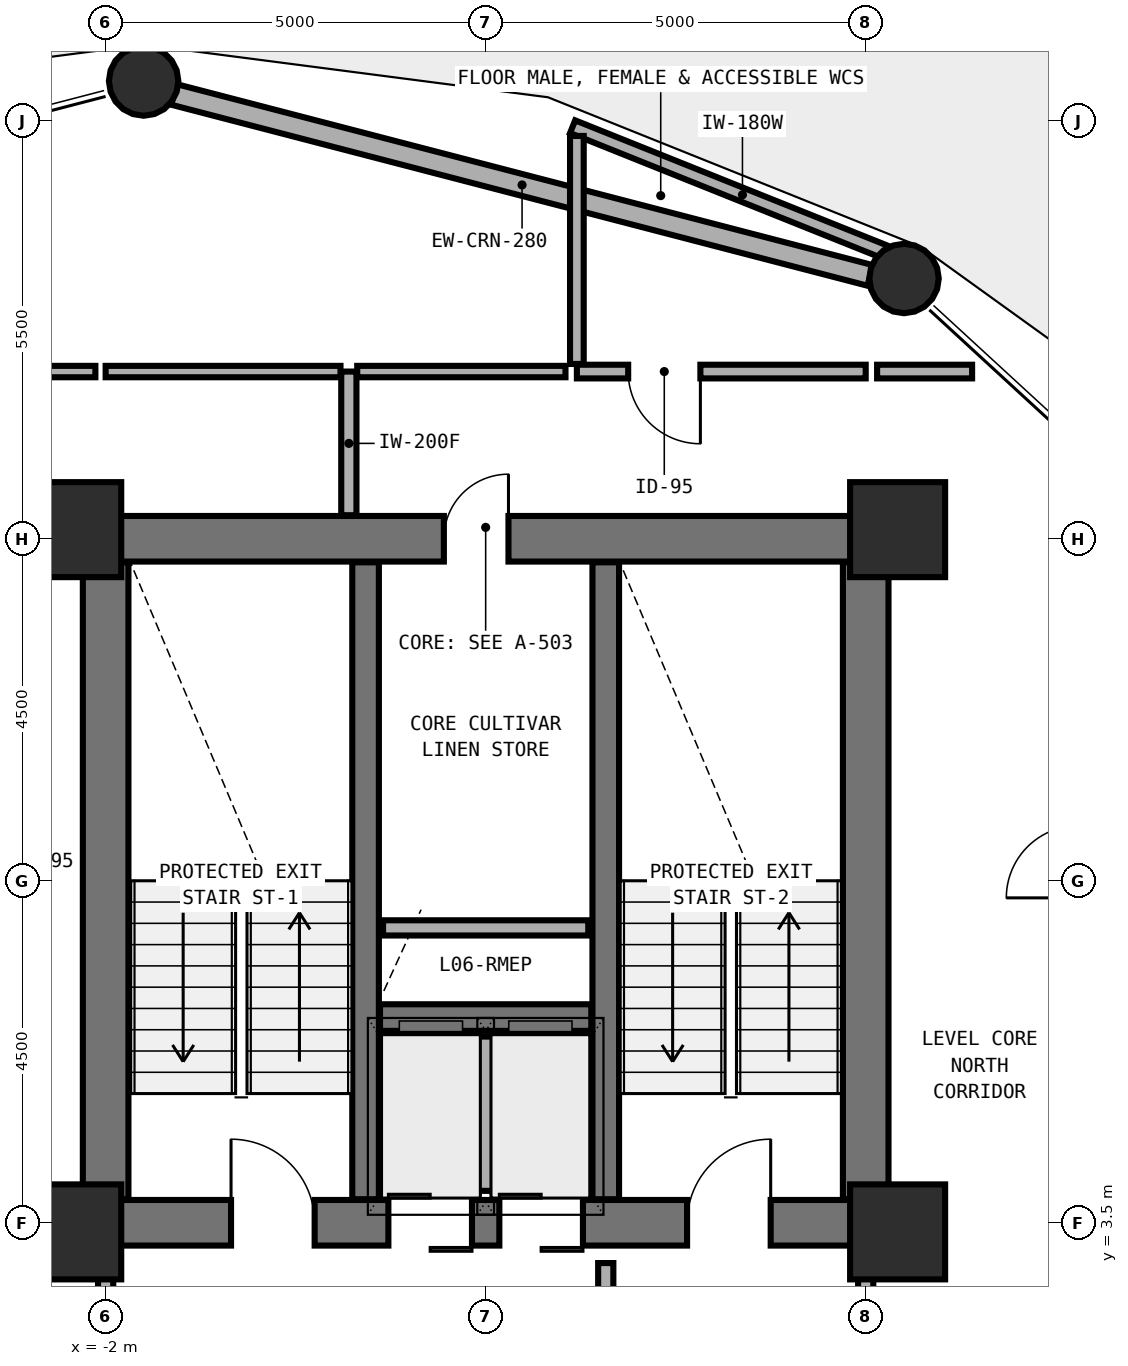
"""IFC4 building model, lengths in metres.
Left out: names, types, materials, properties, quantities, classifications, styles, units other than length and angle.
Written with IfcOpenShell. Run it as: python <this file> out.ifc"""

import sys

from ifc_helpers import new_model, si_unit, direction, frame, frame_2d, origin, origin_2d, place, context, subcontext, project, spatial, rectangle, hollow_circle, extrude, element, fill, save


model = new_model("IFC4")
c1 = context("Model", 3, precision=1e-05, world=origin(), true_north=direction((0.0, 1.0)))
c2 = subcontext(c1, "Body", "Model", "MODEL_VIEW")
j1 = project(units=[si_unit("LENGTHUNIT", "METRE"), si_unit("PLANEANGLEUNIT", "RADIAN")], contexts=[c1])
p1 = place(None, origin())
s1 = spatial("IfcSite", under=j1, at=p1, CompositionType="ELEMENT")
p2 = place(p1, origin())
s2 = spatial("IfcBuilding", under=s1, at=p2, CompositionType="ELEMENT")
p3 = place(p2, frame((0.0, 0.0, 27.6)))
s3 = spatial("IfcBuildingStorey", under=s2, at=p3, CompositionType="ELEMENT", Elevation=27.6)
p4 = place(p3, frame((-2.0, 3.5, 0.0), z_axis=(0.0, 0.0, 1.0), x_axis=(1.0, 0.0, 0.0)))
e1 = element("IfcWall", 1, at=p4, inside=s3, PredefinedType="SHEAR", context=c2, shape_type="SweptSolid", body=[
    extrude(rectangle(XDim=10.0, YDim=0.6, at=frame_2d((5.0, 0.0))), origin(), (0.0, 0.0, 1.0), 3.892),
])
p5 = place(p4, frame((1.65, 0.0, 0.0)))
e2 = element("IfcOpeningElement", 2, at=p5, cuts=e1, PredefinedType="OPENING", context=c2, shape_type="SweptSolid", body=[
    extrude(rectangle(XDim=1.1, YDim=2.15, at=frame_2d((0.55, 1.075))), frame((0.0, 0.31, 0.0), z_axis=(0.0, -1.0, 0.0), x_axis=(1.0, 0.0, 0.0)), (0.0, 0.0, 1.0), 0.62),
])
p6 = place(p4, frame((7.65, 0.0, 0.0)))
e3 = element("IfcOpeningElement", 3, at=p6, cuts=e1, PredefinedType="OPENING", context=c2, shape_type="SweptSolid", body=[
    extrude(rectangle(XDim=1.1, YDim=2.15, at=frame_2d((0.55, 1.075))), frame((0.0, 0.31, 0.0), z_axis=(0.0, -1.0, 0.0), x_axis=(1.0, 0.0, 0.0)), (0.0, 0.0, 1.0), 0.62),
])
p7 = place(p4, frame((3.72, 0.0, 0.0)))
e4 = element("IfcOpeningElement", 4, at=p7, cuts=e1, PredefinedType="OPENING", context=c2, shape_type="SweptSolid", body=[
    extrude(rectangle(XDim=1.1, YDim=2.2, at=frame_2d((0.55, 1.1))), frame((0.0, 0.31, 0.0), z_axis=(0.0, -1.0, 0.0), x_axis=(1.0, 0.0, 0.0)), (0.0, 0.0, 1.0), 0.62),
])
p8 = place(p4, frame((5.18, 0.0, 0.0)))
e5 = element("IfcOpeningElement", 5, at=p8, cuts=e1, PredefinedType="OPENING", context=c2, shape_type="SweptSolid", body=[
    extrude(rectangle(XDim=1.1, YDim=2.2, at=frame_2d((0.55, 1.1))), frame((0.0, 0.31, 0.0), z_axis=(0.0, -1.0, 0.0), x_axis=(1.0, 0.0, 0.0)), (0.0, 0.0, 1.0), 0.62),
])
p9 = place(p3, frame((-2.0, 12.5, 0.0), z_axis=(0.0, 0.0, 1.0), x_axis=(1.0, 0.0, 0.0)))
e6 = element("IfcWall", 6, at=p9, inside=s3, PredefinedType="SHEAR", context=c2, shape_type="SweptSolid", body=[
    extrude(rectangle(XDim=10.0, YDim=0.6, at=frame_2d((5.0, 0.0))), origin(), (0.0, 0.0, 1.0), 3.892),
])
p10 = place(p9, frame((4.45, 0.0, 0.0)))
e7 = element("IfcOpeningElement", 7, at=p10, cuts=e6, PredefinedType="OPENING", context=c2, shape_type="SweptSolid", body=[
    extrude(rectangle(XDim=0.85, YDim=2.1, at=frame_2d((0.425, 1.05))), frame((0.0, 0.31, 0.0), z_axis=(0.0, -1.0, 0.0), x_axis=(1.0, 0.0, 0.0)), (0.0, 0.0, 1.0), 0.62),
])
for number, where, z_axis, x_axis in (
    (8, (-2.0, 3.81, 0.0), (0.0, 0.0, 1.0), (0.0, 1.0, 0.0)),
    (9, (8.0, 3.81, 0.0), (0.0, 0.0, 1.0), (0.0, 1.0, 0.0)),
):
    element("IfcWall", number, at=place(p3, frame(where, z_axis=z_axis, x_axis=x_axis)), inside=s3, PredefinedType="SHEAR", context=c2, shape_type="SweptSolid", body=[
        extrude(rectangle(XDim=8.38, YDim=0.6, at=frame_2d((4.19, 0.0))), origin(), (0.0, 0.0, 1.0), 3.892),
    ])
for number, where, z_axis, x_axis in (
    (10, (1.42, 3.81, 0.0), (0.0, 0.0, 1.0), (0.0, 1.0, 0.0)),
    (11, (4.58, 3.81, 0.0), (0.0, 0.0, 1.0), (0.0, 1.0, 0.0)),
):
    element("IfcWall", number, at=place(p3, frame(where, z_axis=z_axis, x_axis=x_axis)), inside=s3, PredefinedType="SHEAR", context=c2, shape_type="SweptSolid", body=[
        extrude(rectangle(XDim=8.38, YDim=0.35, at=frame_2d((4.19, 0.0))), origin(), (0.0, 0.0, 1.0), 3.892),
    ])
p11 = place(p3, frame((1.61, 6.2, 0.0), z_axis=(0.0, 0.0, 1.0), x_axis=(1.0, 0.0, 0.0)))
e12 = element("IfcWall", 12, at=p11, inside=s3, PredefinedType="SHEAR", context=c2, shape_type="SweptSolid", body=[
    extrude(rectangle(XDim=2.78, YDim=0.35, at=frame_2d((1.39, 0.0))), origin(), (0.0, 0.0, 1.0), 3.892),
])
for number, where, z_axis, x_axis in (
    (13, (-2.42, 12.62, 0.0), (0.0, 0.0, 1.0), (1.0, 0.0, 0.0)),
    (14, (8.42, 12.62, 0.0), (0.0, 0.0, 1.0), (1.0, 0.0, 0.0)),
    (15, (-2.42, 3.38, 0.0), (0.0, 0.0, 1.0), (1.0, 0.0, 0.0)),
    (16, (8.42, 3.38, 0.0), (0.0, 0.0, 1.0), (1.0, 0.0, 0.0)),
):
    element("IfcColumn", number, at=place(p3, frame(where, z_axis=z_axis, x_axis=x_axis)), inside=s3, PredefinedType="COLUMN", context=c2, shape_type="SweptSolid", body=[
        extrude(rectangle(XDim=1.25, YDim=1.25, at=origin_2d()), origin(), (0.0, 0.0, 1.0), 3.875),
    ])
p12 = place(p3, frame((8.458, 15.861, 0.0), z_axis=(0.024236523215, 0.032609140326, 0.999174276545), x_axis=(-0.802595483818, 0.596523670406, 0.0)))
e17 = element("IfcColumn", 17, at=p12, inside=s3, PredefinedType="COLUMN", context=c2, shape_type="SweptSolid", body=[
    extrude(hollow_circle(Radius=0.457, WallThickness=0.032, at=origin_2d()), origin(), (0.0, 0.0, 1.0), 3.878),
])
p13 = place(p3, frame((-1.5, 18.45, 0.0), z_axis=(0.0, 0.037649698668, 0.999290998754), x_axis=(-1.0, 0.0, 0.0)))
e18 = element("IfcColumn", 18, at=p13, inside=s3, PredefinedType="COLUMN", context=c2, shape_type="SweptSolid", body=[
    extrude(hollow_circle(Radius=0.457, WallThickness=0.032, at=origin_2d()), origin(), (0.0, 0.0, 1.0), 3.878),
])
p14 = place(p3, frame((-1.101, 18.346, 0.0), z_axis=(0.0, 0.0, 1.0), x_axis=(0.967836325918, -0.251580695274, 0.0)))
e19 = element("IfcWall", 19, at=p14, inside=s3, PredefinedType="SOLIDWALL", context=c2, shape_type="SweptSolid", body=[
    extrude(rectangle(XDim=9.465, YDim=0.28, at=frame_2d((4.732, 0.0))), origin(), (0.0, 0.0, 1.0), 3.06),
])
p15 = place(p3, frame((3.0, 3.92, 0.0), z_axis=(0.0, 0.0, 1.0), x_axis=(0.0, 1.0, 0.0)))
e20 = element("IfcWall", 20, at=p15, inside=s3, PredefinedType="SOLIDWALL", context=c2, shape_type="SweptSolid", body=[
    extrude(rectangle(XDim=2.03, YDim=0.2, at=frame_2d((1.015, 0.0))), origin(), (0.0, 0.0, 1.0), 3.64),
])
p16 = place(p3, frame((1.65, 7.38, 0.0), z_axis=(0.0, 0.0, 1.0), x_axis=(1.0, 0.0, 0.0)))
e21 = element("IfcWall", 21, at=p16, inside=s3, PredefinedType="SOLIDWALL", context=c2, shape_type="SweptSolid", body=[
    extrude(rectangle(XDim=2.7, YDim=0.2, at=frame_2d((1.35, 0.0))), origin(), (0.0, 0.0, 1.0), 3.64),
])
p17 = place(p3, frame((4.58, 0.83, 0.0), z_axis=(0.0, 0.0, 1.0), x_axis=(0.0, 1.0, 0.0)))
e22 = element("IfcWall", 22, at=p17, inside=s3, PredefinedType="MOVABLE", context=c2, shape_type="SweptSolid", body=[
    extrude(rectangle(XDim=2.14, YDim=0.2, at=frame_2d((1.07, 0.0))), origin(), (0.0, 0.0, 1.0), 3.64),
])
p18 = place(p17, frame((0.66, 0.0, 0.0)))
e23 = element("IfcOpeningElement", 23, at=p18, cuts=e22, PredefinedType="OPENING", context=c2, shape_type="SweptSolid", body=[
    extrude(rectangle(XDim=1.0, YDim=2.1, at=frame_2d((0.5, 1.05))), frame((0.0, 0.11, 0.0), z_axis=(0.0, -1.0, 0.0), x_axis=(1.0, 0.0, 0.0)), (0.0, 0.0, 1.0), 0.22),
])
p19 = place(p3, frame((-2.0, 0.72, 0.0), z_axis=(0.0, 0.0, 1.0), x_axis=(0.0, 1.0, 0.0)))
e24 = element("IfcWall", 24, at=p19, inside=s3, PredefinedType="MOVABLE", context=c2, shape_type="SweptSolid", body=[
    extrude(rectangle(XDim=2.25, YDim=0.2, at=frame_2d((1.125, 0.0))), origin(), (0.0, 0.0, 1.0), 2.872),
])
p20 = place(p19, frame((0.845, 0.0, 0.0)))
e25 = element("IfcOpeningElement", 25, at=p20, cuts=e24, PredefinedType="OPENING", context=c2, shape_type="SweptSolid", body=[
    extrude(rectangle(XDim=0.85, YDim=2.1, at=frame_2d((0.425, 1.05))), frame((0.0, 0.11, 0.0), z_axis=(0.0, -1.0, 0.0), x_axis=(1.0, 0.0, 0.0)), (0.0, 0.0, 1.0), 0.22),
])
p21 = place(p3, frame((8.0, 0.72, 0.0), z_axis=(0.0, 0.0, 1.0), x_axis=(0.0, 1.0, 0.0)))
e26 = element("IfcWall", 26, at=p21, inside=s3, PredefinedType="MOVABLE", context=c2, shape_type="SweptSolid", body=[
    extrude(rectangle(XDim=2.25, YDim=0.2, at=frame_2d((1.125, 0.0))), origin(), (0.0, 0.0, 1.0), 2.872),
])
p22 = place(p21, frame((0.845, 0.0, 0.0)))
e27 = element("IfcOpeningElement", 27, at=p22, cuts=e26, PredefinedType="OPENING", context=c2, shape_type="SweptSolid", body=[
    extrude(rectangle(XDim=0.85, YDim=2.1, at=frame_2d((0.425, 1.05))), frame((0.0, 0.11, 0.0), z_axis=(0.0, -1.0, 0.0), x_axis=(1.0, 0.0, 0.0)), (0.0, 0.0, 1.0), 0.22),
])
p23 = place(p3, frame((8.0, 14.7, 0.0), z_axis=(0.0, 0.0, 1.0), x_axis=(-1.0, 0.0, 0.0)))
e28 = element("IfcWall", 28, at=p23, inside=s3, PredefinedType="PLUMBINGWALL", context=c2, shape_type="SweptSolid", body=[
    extrude(rectangle(XDim=3.8, YDim=0.18, at=frame_2d((1.9, 0.0))), origin(), (0.0, 0.0, 1.0), 3.122),
])
p24 = place(p23, frame((2.175, 0.0, 0.0)))
e29 = element("IfcOpeningElement", 29, at=p24, cuts=e28, PredefinedType="OPENING", context=c2, shape_type="SweptSolid", body=[
    extrude(rectangle(XDim=0.95, YDim=2.1, at=frame_2d((0.475, 1.05))), frame((0.0, 0.1, 0.0), z_axis=(0.0, -1.0, 0.0), x_axis=(1.0, 0.0, 0.0)), (0.0, 0.0, 1.0), 0.2),
])
p25 = place(p3, frame((1.2, 14.7, 0.0), z_axis=(0.0, 0.0, 1.0), x_axis=(0.0, -1.0, 0.0)))
e30 = element("IfcWall", 30, at=p25, inside=s3, PredefinedType="MOVABLE", context=c2, shape_type="SweptSolid", body=[
    extrude(rectangle(XDim=1.89, YDim=0.2, at=frame_2d((0.945, 0.0))), origin(), (0.0, 0.0, 1.0), 3.64),
])
p26 = place(p3, frame((9.4, 14.7, 0.0), z_axis=(0.0, 0.0, 1.0), x_axis=(-1.0, 0.0, 0.0)))
e31 = element("IfcWall", 31, at=p26, inside=s3, PredefinedType="PLUMBINGWALL", context=c2, shape_type="SweptSolid", body=[
    extrude(rectangle(XDim=1.25, YDim=0.18, at=frame_2d((0.625, 0.0))), origin(), (0.0, 0.0, 1.0), 3.122),
])
p27 = place(p3, frame((1.09, 14.7, 0.0), z_axis=(0.0, 0.0, 1.0), x_axis=(-1.0, 0.0, 0.0)))
e32 = element("IfcWall", 32, at=p27, inside=s3, PredefinedType="PARTITIONING", context=c2, shape_type="SweptSolid", body=[
    extrude(rectangle(XDim=3.09, YDim=0.15, at=frame_2d((1.545, 0.0))), origin(), (0.0, 0.0, 1.0), 3.122),
])
p28 = place(p3, frame((-2.135, 14.7, 0.0), z_axis=(0.0, 0.0, 1.0), x_axis=(-1.0, 0.0, 0.0)))
e33 = element("IfcWall", 33, at=p28, inside=s3, PredefinedType="PARTITIONING", context=c2, shape_type="SweptSolid", body=[
    extrude(rectangle(XDim=2.465, YDim=0.15, at=frame_2d((1.232, 0.0))), origin(), (0.0, 0.0, 1.0), 3.122),
])
p29 = place(p3, frame((4.05, 14.7, 0.0), z_axis=(0.0, 0.0, 1.0), x_axis=(-1.0, 0.0, 0.0)))
e34 = element("IfcWall", 34, at=p29, inside=s3, PredefinedType="PARTITIONING", context=c2, shape_type="SweptSolid", body=[
    extrude(rectangle(XDim=2.74, YDim=0.15, at=frame_2d((1.37, 0.0))), origin(), (0.0, 0.0, 1.0), 3.122),
])
p30 = place(p3, frame((4.144, 17.922, 0.0), z_axis=(0.0, 0.0, 1.0), x_axis=(0.928144118183, -0.372221030952, 0.0)))
e35 = element("IfcWall", 35, at=p30, inside=s3, PredefinedType="PLUMBINGWALL", context=c2, shape_type="SweptSolid", body=[
    extrude(rectangle(XDim=4.815, YDim=0.18, at=frame_2d((2.407, 0.0))), origin(), (0.0, 0.0, 1.0), 3.072),
])
p31 = place(p3, frame((4.2, 17.8, 0.0), z_axis=(0.0, 0.0, 1.0), x_axis=(0.0, -1.0, 0.0)))
e36 = element("IfcWall", 36, at=p31, inside=s3, PredefinedType="PLUMBINGWALL", context=c2, shape_type="SweptSolid", body=[
    extrude(rectangle(XDim=3.0, YDim=0.18, at=frame_2d((1.5, 0.0))), origin(), (0.0, 0.0, 1.0), 3.64),
])
p32 = place(p5, origin())
e37 = element("IfcDoor", 37, at=p32, inside=s3, OperationType="SINGLE_SWING_LEFT", PredefinedType="DOOR", context=c2, shape_type="SweptSolid", body=[
    extrude(rectangle(XDim=1.1, YDim=2.15, at=frame_2d((0.55, 1.075))), frame((0.0, 0.025, 0.0), z_axis=(0.0, -1.0, 0.0), x_axis=(1.0, 0.0, 0.0)), (0.0, 0.0, 1.0), 0.05),
])
fill(e2, e37)
p33 = place(p6, origin())
e38 = element("IfcDoor", 38, at=p33, inside=s3, OperationType="SINGLE_SWING_RIGHT", PredefinedType="DOOR", context=c2, shape_type="SweptSolid", body=[
    extrude(rectangle(XDim=1.1, YDim=2.15, at=frame_2d((0.55, 1.075))), frame((0.0, 0.025, 0.0), z_axis=(0.0, -1.0, 0.0), x_axis=(1.0, 0.0, 0.0)), (0.0, 0.0, 1.0), 0.05),
])
fill(e3, e38)
p34 = place(p7, origin())
e39 = element("IfcDoor", 39, at=p34, inside=s3, OperationType="DOUBLE_DOOR_SLIDING", PredefinedType="DOOR", context=c2, shape_type="SweptSolid", body=[
    extrude(rectangle(XDim=1.1, YDim=2.2, at=frame_2d((0.55, 1.1))), frame((0.0, 0.025, 0.0), z_axis=(0.0, -1.0, 0.0), x_axis=(1.0, 0.0, 0.0)), (0.0, 0.0, 1.0), 0.05),
])
fill(e4, e39)
p35 = place(p8, origin())
e40 = element("IfcDoor", 40, at=p35, inside=s3, OperationType="DOUBLE_DOOR_SLIDING", PredefinedType="DOOR", context=c2, shape_type="SweptSolid", body=[
    extrude(rectangle(XDim=1.1, YDim=2.2, at=frame_2d((0.55, 1.1))), frame((0.0, 0.025, 0.0), z_axis=(0.0, -1.0, 0.0), x_axis=(1.0, 0.0, 0.0)), (0.0, 0.0, 1.0), 0.05),
])
fill(e5, e40)
p36 = place(p10, origin())
e41 = element("IfcDoor", 41, at=p36, inside=s3, OperationType="SINGLE_SWING_RIGHT", PredefinedType="DOOR", context=c2, shape_type="SweptSolid", body=[
    extrude(rectangle(XDim=0.85, YDim=2.1, at=frame_2d((0.425, 1.05))), frame((0.0, 0.025, 0.0), z_axis=(0.0, -1.0, 0.0), x_axis=(1.0, 0.0, 0.0)), (0.0, 0.0, 1.0), 0.05),
])
fill(e7, e41)
p37 = place(p24, origin())
e42 = element("IfcDoor", 42, at=p37, inside=s3, OperationType="SINGLE_SWING_LEFT", PredefinedType="DOOR", context=c2, shape_type="SweptSolid", body=[
    extrude(rectangle(XDim=0.95, YDim=2.1, at=frame_2d((0.475, 1.05))), frame((0.0, 0.025, 0.0), z_axis=(0.0, -1.0, 0.0), x_axis=(1.0, 0.0, 0.0)), (0.0, 0.0, 1.0), 0.05),
])
fill(e29, e42)
save(model, sys.argv[1])
